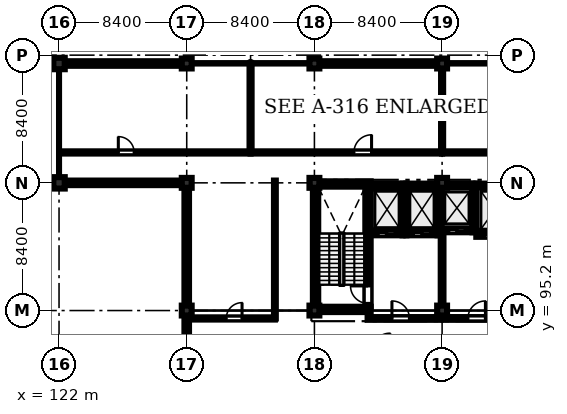
"""IFC4 building model, lengths in metres.
Left out: names, types, materials, properties, quantities, classifications, styles, units other than length and angle.
Written with IfcOpenShell. Run it as: python <this file> out.ifc"""

import sys

from ifc_helpers import new_model, si_unit, direction, frame, frame_2d, origin, origin_2d, place, context, subcontext, project, spatial, rectangle, extrude, element, fill, save


model = new_model("IFC4")
c1 = context("Model", 3, precision=1e-05, world=origin(), true_north=direction((0.0, 1.0)))
c2 = subcontext(c1, "Body", "Model", "MODEL_VIEW")
j1 = project(units=[si_unit("LENGTHUNIT", "METRE"), si_unit("PLANEANGLEUNIT", "RADIAN")], contexts=[c1])
p1 = place(None, origin())
s1 = spatial("IfcSite", under=j1, at=p1, CompositionType="ELEMENT")
p2 = place(p1, origin())
s2 = spatial("IfcBuilding", under=s1, at=p2, CompositionType="ELEMENT")
p3 = place(p2, frame((0.0, 0.0, 57.0)))
s3 = spatial("IfcBuildingStorey", under=s2, at=p3, CompositionType="ELEMENT", Elevation=57.0)
for number, where, z_axis, x_axis in (
    (1, (122.0, 103.6, 0.0), (0.0, 0.0, 1.0), (1.0, 0.0, 0.0)),
    (2, (122.0, 111.45, 0.0), (0.0, 0.0, 1.0), (1.0, 0.0, 0.0)),
):
    element("IfcColumn", number, at=place(p3, frame(where, z_axis=z_axis, x_axis=x_axis)), inside=s3, PredefinedType="COLUMN", context=c2, shape_type="SweptSolid", body=[
        extrude(rectangle(XDim=0.75, YDim=0.75, at=origin_2d()), origin(), (0.0, 0.0, 1.0), 4.02),
    ])
for number, where, z_axis, x_axis in (
    (3, (130.4, 95.2, 0.0), (0.0, 0.0, 1.0), (1.0, 0.0, 0.0)),
    (4, (130.4, 103.6, 0.0), (0.0, 0.0, 1.0), (1.0, 0.0, 0.0)),
    (5, (130.4, 111.45, 0.0), (0.0, 0.0, 1.0), (1.0, 0.0, 0.0)),
    (6, (138.8, 95.2, 0.0), (0.0, 0.0, 1.0), (1.0, 0.0, 0.0)),
    (7, (138.8, 103.6, 0.0), (0.0, 0.0, 1.0), (1.0, 0.0, 0.0)),
    (8, (138.8, 111.45, 0.0), (0.0, 0.0, 1.0), (1.0, 0.0, 0.0)),
    (9, (147.2, 95.2, 0.0), (0.0, 0.0, 1.0), (1.0, 0.0, 0.0)),
    (10, (147.2, 103.6, 0.0), (0.0, 0.0, 1.0), (1.0, 0.0, 0.0)),
    (11, (147.2, 111.45, 0.0), (0.0, 0.0, 1.0), (1.0, 0.0, 0.0)),
):
    element("IfcColumn", number, at=place(p3, frame(where, z_axis=z_axis, x_axis=x_axis)), inside=s3, PredefinedType="COLUMN", context=c2, shape_type="SweptSolid", body=[
        extrude(rectangle(XDim=0.65, YDim=0.65, at=origin_2d()), origin(), (0.0, 0.0, 1.0), 4.02),
    ])
for number, where, z_axis, x_axis in (
    (12, (138.7, 95.275, 0.0), (0.0, 0.0, 1.0), (1.0, 0.0, 0.0)),
    (13, (138.7, 103.525, 0.0), (0.0, 0.0, 1.0), (1.0, 0.0, 0.0)),
):
    element("IfcWall", number, at=place(p3, frame(where, z_axis=z_axis, x_axis=x_axis)), inside=s3, PredefinedType="SHEAR", context=c2, shape_type="SweptSolid", body=[
        extrude(rectangle(XDim=3.8, YDim=0.35, at=frame_2d((1.9, 0.0))), origin(), (0.0, 0.0, 1.0), 4.02),
    ])
p4 = place(p3, frame((138.875, 95.45, 0.0), z_axis=(0.0, 0.0, 1.0), x_axis=(0.0, 1.0, 0.0)))
e14 = element("IfcWall", 14, at=p4, inside=s3, PredefinedType="SHEAR", context=c2, shape_type="SweptSolid", body=[
    extrude(rectangle(XDim=7.9, YDim=0.35, at=frame_2d((3.95, 0.0))), origin(), (0.0, 0.0, 1.0), 4.02),
])
p5 = place(p3, frame((142.325, 95.45, 0.0), z_axis=(0.0, 0.0, 1.0), x_axis=(0.0, 1.0, 0.0)))
e15 = element("IfcWall", 15, at=p5, inside=s3, PredefinedType="SHEAR", context=c2, shape_type="SweptSolid", body=[
    extrude(rectangle(XDim=7.9, YDim=0.35, at=frame_2d((3.95, 0.0))), origin(), (0.0, 0.0, 1.0), 4.02),
])
p6 = place(p5, frame((0.22, 0.0, 0.0)))
e16 = element("IfcOpeningElement", 16, at=p6, cuts=e15, PredefinedType="OPENING", context=c2, shape_type="SweptSolid", body=[
    extrude(rectangle(XDim=1.15, YDim=2.15, at=frame_2d((0.575, 1.075))), frame((0.0, 0.185, 0.0), z_axis=(0.0, -1.0, 0.0), x_axis=(1.0, 0.0, 0.0)), (0.0, 0.0, 1.0), 0.37),
])
p7 = place(p3, frame((142.5, 100.275, 0.0), z_axis=(0.0, 0.0, 1.0), x_axis=(1.0, 0.0, 0.0)))
e17 = element("IfcWall", 17, at=p7, inside=s3, PredefinedType="SHEAR", context=c2, shape_type="SweptSolid", body=[
    extrude(rectangle(XDim=2.1, YDim=0.25, at=frame_2d((1.05, 0.0))), origin(), (0.0, 0.0, 1.0), 4.02),
])
p8 = place(p7, frame((0.5, 0.0, 0.0)))
e18 = element("IfcOpeningElement", 18, at=p8, cuts=e17, PredefinedType="OPENING", context=c2, shape_type="SweptSolid", body=[
    extrude(rectangle(XDim=1.1, YDim=2.15, at=frame_2d((0.55, 1.075))), frame((0.0, 0.135, 0.0), z_axis=(0.0, -1.0, 0.0), x_axis=(1.0, 0.0, 0.0)), (0.0, 0.0, 1.0), 0.27),
])
p9 = place(p3, frame((142.5, 103.425, 0.0), z_axis=(0.0, 0.0, 1.0), x_axis=(1.0, 0.0, 0.0)))
e19 = element("IfcWall", 19, at=p9, inside=s3, PredefinedType="SHEAR", context=c2, shape_type="SweptSolid", body=[
    extrude(rectangle(XDim=2.1, YDim=0.25, at=frame_2d((1.05, 0.0))), origin(), (0.0, 0.0, 1.0), 4.02),
])
p10 = place(p3, frame((144.725, 100.15, 0.0), z_axis=(0.0, 0.0, 1.0), x_axis=(0.0, 1.0, 0.0)))
e20 = element("IfcWall", 20, at=p10, inside=s3, PredefinedType="SHEAR", context=c2, shape_type="SweptSolid", body=[
    extrude(rectangle(XDim=3.4, YDim=0.25, at=frame_2d((1.7, 0.0))), origin(), (0.0, 0.0, 1.0), 4.02),
])
p11 = place(p3, frame((144.85, 100.275, 0.0), z_axis=(0.0, 0.0, 1.0), x_axis=(1.0, 0.0, 0.0)))
e21 = element("IfcWall", 21, at=p11, inside=s3, PredefinedType="SHEAR", context=c2, shape_type="SweptSolid", body=[
    extrude(rectangle(XDim=2.05, YDim=0.25, at=frame_2d((1.025, 0.0))), origin(), (0.0, 0.0, 1.0), 4.02),
])
p12 = place(p11, frame((0.465, 0.0, 0.0)))
e22 = element("IfcOpeningElement", 22, at=p12, cuts=e21, PredefinedType="OPENING", context=c2, shape_type="SweptSolid", body=[
    extrude(rectangle(XDim=1.12, YDim=2.15, at=frame_2d((0.56, 1.075))), frame((0.0, 0.135, 0.0), z_axis=(0.0, -1.0, 0.0), x_axis=(1.0, 0.0, 0.0)), (0.0, 0.0, 1.0), 0.27),
])
p13 = place(p3, frame((144.85, 103.425, 0.0), z_axis=(0.0, 0.0, 1.0), x_axis=(1.0, 0.0, 0.0)))
e23 = element("IfcWall", 23, at=p13, inside=s3, PredefinedType="SHEAR", context=c2, shape_type="SweptSolid", body=[
    extrude(rectangle(XDim=2.05, YDim=0.25, at=frame_2d((1.025, 0.0))), origin(), (0.0, 0.0, 1.0), 4.02),
])
p14 = place(p3, frame((147.025, 100.15, 0.0), z_axis=(0.0, 0.0, 1.0), x_axis=(0.0, 1.0, 0.0)))
e24 = element("IfcWall", 24, at=p14, inside=s3, PredefinedType="SHEAR", context=c2, shape_type="SweptSolid", body=[
    extrude(rectangle(XDim=3.4, YDim=0.25, at=frame_2d((1.7, 0.0))), origin(), (0.0, 0.0, 1.0), 4.02),
])
p15 = place(p3, frame((147.15, 100.475, 0.0), z_axis=(0.0, 0.0, 1.0), x_axis=(1.0, 0.0, 0.0)))
e25 = element("IfcWall", 25, at=p15, inside=s3, PredefinedType="SHEAR", context=c2, shape_type="SweptSolid", body=[
    extrude(rectangle(XDim=2.05, YDim=0.25, at=frame_2d((1.025, 0.0))), origin(), (0.0, 0.0, 1.0), 4.02),
])
p16 = place(p15, frame((0.495, 0.0, 0.0)))
e26 = element("IfcOpeningElement", 26, at=p16, cuts=e25, PredefinedType="OPENING", context=c2, shape_type="SweptSolid", body=[
    extrude(rectangle(XDim=1.06, YDim=2.15, at=frame_2d((0.53, 1.075))), frame((0.0, 0.135, 0.0), z_axis=(0.0, -1.0, 0.0), x_axis=(1.0, 0.0, 0.0)), (0.0, 0.0, 1.0), 0.27),
])
p17 = place(p3, frame((147.15, 103.425, 0.0), z_axis=(0.0, 0.0, 1.0), x_axis=(1.0, 0.0, 0.0)))
e27 = element("IfcWall", 27, at=p17, inside=s3, PredefinedType="SHEAR", context=c2, shape_type="SweptSolid", body=[
    extrude(rectangle(XDim=2.05, YDim=0.25, at=frame_2d((1.025, 0.0))), origin(), (0.0, 0.0, 1.0), 4.02),
])
p18 = place(p3, frame((149.325, 100.35, 0.0), z_axis=(0.0, 0.0, 1.0), x_axis=(0.0, 1.0, 0.0)))
e28 = element("IfcWall", 28, at=p18, inside=s3, PredefinedType="SHEAR", context=c2, shape_type="SweptSolid", body=[
    extrude(rectangle(XDim=3.2, YDim=0.25, at=frame_2d((1.6, 0.0))), origin(), (0.0, 0.0, 1.0), 4.02),
])
p19 = place(p3, frame((149.45, 100.175, 0.0), z_axis=(0.0, 0.0, 1.0), x_axis=(1.0, 0.0, 0.0)))
e29 = element("IfcWall", 29, at=p19, inside=s3, PredefinedType="SHEAR", context=c2, shape_type="SweptSolid", body=[
    extrude(rectangle(XDim=2.45, YDim=0.25, at=frame_2d((1.225, 0.0))), origin(), (0.0, 0.0, 1.0), 4.02),
])
p20 = place(p19, frame((0.575, 0.0, 0.0)))
e30 = element("IfcOpeningElement", 30, at=p20, cuts=e29, PredefinedType="OPENING", context=c2, shape_type="SweptSolid", body=[
    extrude(rectangle(XDim=1.3, YDim=2.25, at=frame_2d((0.65, 1.125))), frame((0.0, 0.135, 0.0), z_axis=(0.0, -1.0, 0.0), x_axis=(1.0, 0.0, 0.0)), (0.0, 0.0, 1.0), 0.27),
])
p21 = place(p3, frame((149.45, 103.425, 0.0), z_axis=(0.0, 0.0, 1.0), x_axis=(1.0, 0.0, 0.0)))
e31 = element("IfcWall", 31, at=p21, inside=s3, PredefinedType="SHEAR", context=c2, shape_type="SweptSolid", body=[
    extrude(rectangle(XDim=2.45, YDim=0.25, at=frame_2d((1.225, 0.0))), origin(), (0.0, 0.0, 1.0), 4.02),
])
p22 = place(p3, frame((122.375, 111.45, 0.0), z_axis=(0.0, 0.0, 1.0), x_axis=(1.0, 0.0, 0.0)))
e32 = element("IfcWall", 32, at=p22, inside=s3, PredefinedType="STANDARD", context=c2, shape_type="SweptSolid", body=[
    extrude(rectangle(XDim=7.7, YDim=0.3, at=frame_2d((3.85, 0.0))), origin(), (0.0, 0.0, 1.0), 3.32),
])
p23 = place(p22, frame((0.85, 0.0, 0.9)))
e33 = element("IfcOpeningElement", 33, at=p23, cuts=e32, PredefinedType="OPENING", context=c2, shape_type="SweptSolid", body=[
    extrude(rectangle(XDim=1.9, YDim=2.1, at=frame_2d((0.95, 1.05))), frame((0.0, 0.16, 0.0), z_axis=(0.0, -1.0, 0.0), x_axis=(1.0, 0.0, 0.0)), (0.0, 0.0, 1.0), 0.32),
])
p24 = place(p22, frame((4.65, 0.0, 0.9)))
e34 = element("IfcOpeningElement", 34, at=p24, cuts=e32, PredefinedType="OPENING", context=c2, shape_type="SweptSolid", body=[
    extrude(rectangle(XDim=1.9, YDim=2.1, at=frame_2d((0.95, 1.05))), frame((0.0, 0.16, 0.0), z_axis=(0.0, -1.0, 0.0), x_axis=(1.0, 0.0, 0.0)), (0.0, 0.0, 1.0), 0.32),
])
p25 = place(p3, frame((139.125, 111.45, 0.0), z_axis=(0.0, 0.0, 1.0), x_axis=(1.0, 0.0, 0.0)))
e35 = element("IfcWall", 35, at=p25, inside=s3, PredefinedType="STANDARD", context=c2, shape_type="SweptSolid", body=[
    extrude(rectangle(XDim=7.75, YDim=0.3, at=frame_2d((3.875, 0.0))), origin(), (0.0, 0.0, 1.0), 3.32),
])
p26 = place(p25, frame((0.85, 0.0, 0.9)))
e36 = element("IfcOpeningElement", 36, at=p26, cuts=e35, PredefinedType="OPENING", context=c2, shape_type="SweptSolid", body=[
    extrude(rectangle(XDim=1.9, YDim=2.1, at=frame_2d((0.95, 1.05))), frame((0.0, 0.16, 0.0), z_axis=(0.0, -1.0, 0.0), x_axis=(1.0, 0.0, 0.0)), (0.0, 0.0, 1.0), 0.32),
])
p27 = place(p25, frame((4.65, 0.0, 0.9)))
e37 = element("IfcOpeningElement", 37, at=p27, cuts=e35, PredefinedType="OPENING", context=c2, shape_type="SweptSolid", body=[
    extrude(rectangle(XDim=1.9, YDim=2.1, at=frame_2d((0.95, 1.05))), frame((0.0, 0.16, 0.0), z_axis=(0.0, -1.0, 0.0), x_axis=(1.0, 0.0, 0.0)), (0.0, 0.0, 1.0), 0.32),
])
p28 = place(p3, frame((130.4, 92.15, 0.0), z_axis=(0.0, 0.0, 1.0), x_axis=(0.0, 1.0, 0.0)))
e38 = element("IfcWall", 38, at=p28, inside=s3, PredefinedType="STANDARD", context=c2, shape_type="SweptSolid", body=[
    extrude(rectangle(XDim=2.725, YDim=0.3, at=frame_2d((1.363, 0.0))), origin(), (0.0, 0.0, 1.0), 4.02),
])
p29 = place(p3, frame((130.4, 95.525, 0.0), z_axis=(0.0, 0.0, 1.0), x_axis=(0.0, 1.0, 0.0)))
e39 = element("IfcWall", 39, at=p29, inside=s3, PredefinedType="STANDARD", context=c2, shape_type="SweptSolid", body=[
    extrude(rectangle(XDim=7.75, YDim=0.3, at=frame_2d((3.875, 0.0))), origin(), (0.0, 0.0, 1.0), 3.32),
])
p30 = place(p29, frame((2.4, 0.0, 1.0)))
e40 = element("IfcOpeningElement", 40, at=p30, cuts=e39, PredefinedType="OPENING", context=c2, shape_type="SweptSolid", body=[
    extrude(rectangle(XDim=1.8, YDim=1.8, at=frame_2d((0.9, 0.9))), frame((0.0, 0.16, 0.0), z_axis=(0.0, -1.0, 0.0), x_axis=(1.0, 0.0, 0.0)), (0.0, 0.0, 1.0), 0.32),
])
p31 = place(p3, frame((130.075, 103.6, 0.0), z_axis=(0.0, 0.0, 1.0), x_axis=(-1.0, 0.0, 0.0)))
e41 = element("IfcWall", 41, at=p31, inside=s3, PredefinedType="STANDARD", context=c2, shape_type="SweptSolid", body=[
    extrude(rectangle(XDim=7.7, YDim=0.3, at=frame_2d((3.85, 0.0))), origin(), (0.0, 0.0, 1.0), 3.32),
])
p32 = place(p3, frame((142.3, 94.68, 0.0), z_axis=(0.0, 0.0, 1.0), x_axis=(1.0, 0.0, 0.0)))
e42 = element("IfcWall", 42, at=p32, inside=s3, PredefinedType="STANDARD", context=c2, shape_type="SweptSolid", body=[
    extrude(rectangle(XDim=4.8, YDim=0.18, at=frame_2d((2.4, 0.0))), origin(), (0.0, 0.0, 1.0), 4.02),
])
p33 = place(p32, frame((1.6, 0.0, 0.0)))
e43 = element("IfcOpeningElement", 43, at=p33, cuts=e42, PredefinedType="OPENING", context=c2, shape_type="SweptSolid", body=[
    extrude(rectangle(XDim=1.15, YDim=2.15, at=frame_2d((0.575, 1.075))), frame((0.0, 0.1, 0.0), z_axis=(0.0, -1.0, 0.0), x_axis=(1.0, 0.0, 0.0)), (0.0, 0.0, 1.0), 0.2),
])
p34 = place(p3, frame((147.3, 94.68, 0.0), z_axis=(0.0, 0.0, 1.0), x_axis=(1.0, 0.0, 0.0)))
e44 = element("IfcWall", 44, at=p34, inside=s3, PredefinedType="STANDARD", context=c2, shape_type="SweptSolid", body=[
    extrude(rectangle(XDim=4.85, YDim=0.18, at=frame_2d((2.425, 0.0))), origin(), (0.0, 0.0, 1.0), 4.02),
])
p35 = place(p34, frame((1.6, 0.0, 0.0)))
e45 = element("IfcOpeningElement", 45, at=p35, cuts=e44, PredefinedType="OPENING", context=c2, shape_type="SweptSolid", body=[
    extrude(rectangle(XDim=1.15, YDim=2.15, at=frame_2d((0.575, 1.075))), frame((0.0, 0.1, 0.0), z_axis=(0.0, -1.0, 0.0), x_axis=(1.0, 0.0, 0.0)), (0.0, 0.0, 1.0), 0.2),
])
p36 = place(p3, frame((147.2, 95.75, 0.0), z_axis=(0.0, 0.0, 1.0), x_axis=(0.0, 1.0, 0.0)))
e46 = element("IfcWall", 46, at=p36, inside=s3, PredefinedType="STANDARD", context=c2, shape_type="SweptSolid", body=[
    extrude(rectangle(XDim=4.5, YDim=0.18, at=frame_2d((2.25, 0.0))), origin(), (0.0, 0.0, 1.0), 3.32),
])
p37 = place(p3, frame((136.2, 94.68, 0.0), z_axis=(0.0, 0.0, 1.0), x_axis=(0.0, 1.0, 0.0)))
e47 = element("IfcWall", 47, at=p37, inside=s3, PredefinedType="PARTITIONING", context=c2, shape_type="SweptSolid", body=[
    extrude(rectangle(XDim=9.07, YDim=0.12, at=frame_2d((4.535, 0.0))), origin(), (0.0, 0.0, 1.0), 4.02),
])
p38 = place(p3, frame((130.8, 94.68, 0.0), z_axis=(0.0, 0.0, 1.0), x_axis=(1.0, 0.0, 0.0)))
e48 = element("IfcWall", 48, at=p38, inside=s3, PredefinedType="PARTITIONING", context=c2, shape_type="SweptSolid", body=[
    extrude(rectangle(XDim=5.4, YDim=0.145, at=frame_2d((2.7, 0.0))), origin(), (0.0, 0.0, 1.0), 4.02),
])
p39 = place(p38, frame((2.2, 0.0, 0.0)))
e49 = element("IfcOpeningElement", 49, at=p39, cuts=e48, PredefinedType="OPENING", context=c2, shape_type="SweptSolid", body=[
    extrude(rectangle(XDim=1.04, YDim=2.16, at=frame_2d((0.52, 1.08))), frame((0.0, 0.083, 0.0), z_axis=(0.0, -1.0, 0.0), x_axis=(1.0, 0.0, 0.0)), (0.0, 0.0, 1.0), 0.165),
])
p40 = place(p3, frame((122.15, 105.6, 0.0), z_axis=(0.0, 0.0, 1.0), x_axis=(1.0, 0.0, 0.0)))
e50 = element("IfcWall", 50, at=p40, inside=s3, PredefinedType="PARTITIONING", context=c2, shape_type="SweptSolid", body=[
    extrude(rectangle(XDim=12.45, YDim=0.145, at=frame_2d((6.225, 0.0))), origin(), (0.0, 0.0, 1.0), 4.02),
])
p41 = place(p40, frame((3.75, 0.0, 0.0)))
e51 = element("IfcOpeningElement", 51, at=p41, cuts=e50, PredefinedType="OPENING", context=c2, shape_type="SweptSolid", body=[
    extrude(rectangle(XDim=1.04, YDim=2.16, at=frame_2d((0.52, 1.08))), frame((0.0, 0.083, 0.0), z_axis=(0.0, -1.0, 0.0), x_axis=(1.0, 0.0, 0.0)), (0.0, 0.0, 1.0), 0.165),
])
p42 = place(p3, frame((134.6, 105.6, 0.0), z_axis=(0.0, 0.0, 1.0), x_axis=(1.0, 0.0, 0.0)))
e52 = element("IfcWall", 52, at=p42, inside=s3, PredefinedType="PARTITIONING", context=c2, shape_type="SweptSolid", body=[
    extrude(rectangle(XDim=12.6, YDim=0.145, at=frame_2d((6.3, 0.0))), origin(), (0.0, 0.0, 1.0), 4.02),
])
p43 = place(p42, frame((6.8, 0.0, 0.0)))
e53 = element("IfcOpeningElement", 53, at=p43, cuts=e52, PredefinedType="OPENING", context=c2, shape_type="SweptSolid", body=[
    extrude(rectangle(XDim=1.16, YDim=2.2, at=frame_2d((0.58, 1.1))), frame((0.0, 0.083, 0.0), z_axis=(0.0, -1.0, 0.0), x_axis=(1.0, 0.0, 0.0)), (0.0, 0.0, 1.0), 0.165),
])
p44 = place(p3, frame((134.6, 105.6, 0.0), z_axis=(0.0, 0.0, 1.0), x_axis=(0.0, 1.0, 0.0)))
e54 = element("IfcWall", 54, at=p44, inside=s3, PredefinedType="PARTITIONING", context=c2, shape_type="SweptSolid", body=[
    extrude(rectangle(XDim=5.75, YDim=0.135, at=frame_2d((2.875, 0.0))), origin(), (0.0, 0.0, 1.0), 3.57),
])
p45 = place(p3, frame((147.2, 105.6, 0.0), z_axis=(0.0, 0.0, 1.0), x_axis=(1.0, 0.0, 0.0)))
e55 = element("IfcWall", 55, at=p45, inside=s3, PredefinedType="PARTITIONING", context=c2, shape_type="SweptSolid", body=[
    extrude(rectangle(XDim=8.4, YDim=0.145, at=frame_2d((4.2, 0.0))), origin(), (0.0, 0.0, 1.0), 4.02),
])
p46 = place(p45, frame((3.4, 0.0, 0.0)))
e56 = element("IfcOpeningElement", 56, at=p46, cuts=e55, PredefinedType="OPENING", context=c2, shape_type="SweptSolid", body=[
    extrude(rectangle(XDim=1.04, YDim=2.16, at=frame_2d((0.52, 1.08))), frame((0.0, 0.083, 0.0), z_axis=(0.0, -1.0, 0.0), x_axis=(1.0, 0.0, 0.0)), (0.0, 0.0, 1.0), 0.165),
])
p47 = place(p3, frame((147.2, 105.6, 0.0), z_axis=(0.0, 0.0, 1.0), x_axis=(0.0, 1.0, 0.0)))
e57 = element("IfcWall", 57, at=p47, inside=s3, PredefinedType="PARTITIONING", context=c2, shape_type="SweptSolid", body=[
    extrude(rectangle(XDim=5.75, YDim=0.135, at=frame_2d((2.875, 0.0))), origin(), (0.0, 0.0, 1.0), 3.32),
])
p48 = place(p23, origin())
e58 = element("IfcWindow", 58, at=p48, inside=s3, PartitioningType="DOUBLE_PANEL_VERTICAL", PredefinedType="WINDOW", context=c2, shape_type="SweptSolid", body=[
    extrude(rectangle(XDim=1.9, YDim=2.1, at=frame_2d((0.95, 1.05))), frame((0.0, 0.03, 0.0), z_axis=(0.0, -1.0, 0.0), x_axis=(1.0, 0.0, 0.0)), (0.0, 0.0, 1.0), 0.06),
])
fill(e33, e58)
p49 = place(p24, origin())
e59 = element("IfcWindow", 59, at=p49, inside=s3, PartitioningType="DOUBLE_PANEL_VERTICAL", PredefinedType="WINDOW", context=c2, shape_type="SweptSolid", body=[
    extrude(rectangle(XDim=1.9, YDim=2.1, at=frame_2d((0.95, 1.05))), frame((0.0, 0.03, 0.0), z_axis=(0.0, -1.0, 0.0), x_axis=(1.0, 0.0, 0.0)), (0.0, 0.0, 1.0), 0.06),
])
fill(e34, e59)
p50 = place(p26, origin())
e60 = element("IfcWindow", 60, at=p50, inside=s3, PartitioningType="DOUBLE_PANEL_VERTICAL", PredefinedType="WINDOW", context=c2, shape_type="SweptSolid", body=[
    extrude(rectangle(XDim=1.9, YDim=2.1, at=frame_2d((0.95, 1.05))), frame((0.0, 0.03, 0.0), z_axis=(0.0, -1.0, 0.0), x_axis=(1.0, 0.0, 0.0)), (0.0, 0.0, 1.0), 0.06),
])
fill(e36, e60)
p51 = place(p27, origin())
e61 = element("IfcWindow", 61, at=p51, inside=s3, PartitioningType="DOUBLE_PANEL_VERTICAL", PredefinedType="WINDOW", context=c2, shape_type="SweptSolid", body=[
    extrude(rectangle(XDim=1.9, YDim=2.1, at=frame_2d((0.95, 1.05))), frame((0.0, 0.03, 0.0), z_axis=(0.0, -1.0, 0.0), x_axis=(1.0, 0.0, 0.0)), (0.0, 0.0, 1.0), 0.06),
])
fill(e37, e61)
p52 = place(p30, origin())
e62 = element("IfcWindow", 62, at=p52, inside=s3, PartitioningType="DOUBLE_PANEL_VERTICAL", PredefinedType="WINDOW", context=c2, shape_type="SweptSolid", body=[
    extrude(rectangle(XDim=1.8, YDim=1.8, at=frame_2d((0.9, 0.9))), frame((0.0, 0.03, 0.0), z_axis=(0.0, -1.0, 0.0), x_axis=(1.0, 0.0, 0.0)), (0.0, 0.0, 1.0), 0.06),
])
fill(e40, e62)
p53 = place(p33, origin())
e63 = element("IfcDoor", 63, at=p53, inside=s3, OperationType="SINGLE_SWING_LEFT", PredefinedType="DOOR", context=c2, shape_type="SweptSolid", body=[
    extrude(rectangle(XDim=1.15, YDim=2.15, at=frame_2d((0.575, 1.075))), frame((0.0, 0.025, 0.0), z_axis=(0.0, -1.0, 0.0), x_axis=(1.0, 0.0, 0.0)), (0.0, 0.0, 1.0), 0.05),
])
fill(e43, e63)
p54 = place(p35, origin())
e64 = element("IfcDoor", 64, at=p54, inside=s3, OperationType="SINGLE_SWING_RIGHT", PredefinedType="DOOR", context=c2, shape_type="SweptSolid", body=[
    extrude(rectangle(XDim=1.15, YDim=2.15, at=frame_2d((0.575, 1.075))), frame((0.0, 0.025, 0.0), z_axis=(0.0, -1.0, 0.0), x_axis=(1.0, 0.0, 0.0)), (0.0, 0.0, 1.0), 0.05),
])
fill(e45, e64)
p55 = place(p39, origin())
e65 = element("IfcDoor", 65, at=p55, inside=s3, OperationType="SINGLE_SWING_RIGHT", PredefinedType="DOOR", context=c2, shape_type="SweptSolid", body=[
    extrude(rectangle(XDim=1.04, YDim=2.16, at=frame_2d((0.52, 1.08))), frame((0.0, 0.025, 0.0), z_axis=(0.0, -1.0, 0.0), x_axis=(1.0, 0.0, 0.0)), (0.0, 0.0, 1.0), 0.05),
])
fill(e49, e65)
p56 = place(p41, origin())
e66 = element("IfcDoor", 66, at=p56, inside=s3, OperationType="SINGLE_SWING_LEFT", PredefinedType="DOOR", context=c2, shape_type="SweptSolid", body=[
    extrude(rectangle(XDim=1.04, YDim=2.16, at=frame_2d((0.52, 1.08))), frame((0.0, 0.025, 0.0), z_axis=(0.0, -1.0, 0.0), x_axis=(1.0, 0.0, 0.0)), (0.0, 0.0, 1.0), 0.05),
])
fill(e51, e66)
p57 = place(p43, origin())
e67 = element("IfcDoor", 67, at=p57, inside=s3, OperationType="SINGLE_SWING_RIGHT", PredefinedType="DOOR", context=c2, shape_type="SweptSolid", body=[
    extrude(rectangle(XDim=1.16, YDim=2.2, at=frame_2d((0.58, 1.1))), frame((0.0, 0.025, 0.0), z_axis=(0.0, -1.0, 0.0), x_axis=(1.0, 0.0, 0.0)), (0.0, 0.0, 1.0), 0.05),
])
fill(e53, e67)
p58 = place(p6, origin())
e68 = element("IfcDoor", 68, at=p58, inside=s3, OperationType="SINGLE_SWING_RIGHT", PredefinedType="DOOR", context=c2, shape_type="SweptSolid", body=[
    extrude(rectangle(XDim=1.15, YDim=2.15, at=frame_2d((0.575, 1.075))), frame((0.0, 0.025, 0.0), z_axis=(0.0, -1.0, 0.0), x_axis=(1.0, 0.0, 0.0)), (0.0, 0.0, 1.0), 0.05),
])
fill(e16, e68)
p59 = place(p8, origin())
e69 = element("IfcDoor", 69, at=p59, inside=s3, OperationType="SLIDING_TO_LEFT", PredefinedType="DOOR", context=c2, shape_type="SweptSolid", body=[
    extrude(rectangle(XDim=1.1, YDim=2.15, at=frame_2d((0.55, 1.075))), frame((0.0, 0.025, 0.0), z_axis=(0.0, -1.0, 0.0), x_axis=(1.0, 0.0, 0.0)), (0.0, 0.0, 1.0), 0.05),
])
fill(e18, e69)
p60 = place(p12, origin())
e70 = element("IfcDoor", 70, at=p60, inside=s3, OperationType="SLIDING_TO_LEFT", PredefinedType="DOOR", context=c2, shape_type="SweptSolid", body=[
    extrude(rectangle(XDim=1.12, YDim=2.15, at=frame_2d((0.56, 1.075))), frame((0.0, 0.025, 0.0), z_axis=(0.0, -1.0, 0.0), x_axis=(1.0, 0.0, 0.0)), (0.0, 0.0, 1.0), 0.05),
])
fill(e22, e70)
p61 = place(p16, origin())
e71 = element("IfcDoor", 71, at=p61, inside=s3, OperationType="SLIDING_TO_LEFT", PredefinedType="DOOR", context=c2, shape_type="SweptSolid", body=[
    extrude(rectangle(XDim=1.06, YDim=2.15, at=frame_2d((0.53, 1.075))), frame((0.0, 0.025, 0.0), z_axis=(0.0, -1.0, 0.0), x_axis=(1.0, 0.0, 0.0)), (0.0, 0.0, 1.0), 0.05),
])
fill(e26, e71)
p62 = place(p20, origin())
e72 = element("IfcDoor", 72, at=p62, inside=s3, OperationType="SLIDING_TO_LEFT", PredefinedType="DOOR", context=c2, shape_type="SweptSolid", body=[
    extrude(rectangle(XDim=1.3, YDim=2.25, at=frame_2d((0.65, 1.125))), frame((0.0, 0.025, 0.0), z_axis=(0.0, -1.0, 0.0), x_axis=(1.0, 0.0, 0.0)), (0.0, 0.0, 1.0), 0.05),
])
fill(e30, e72)
save(model, sys.argv[1])
